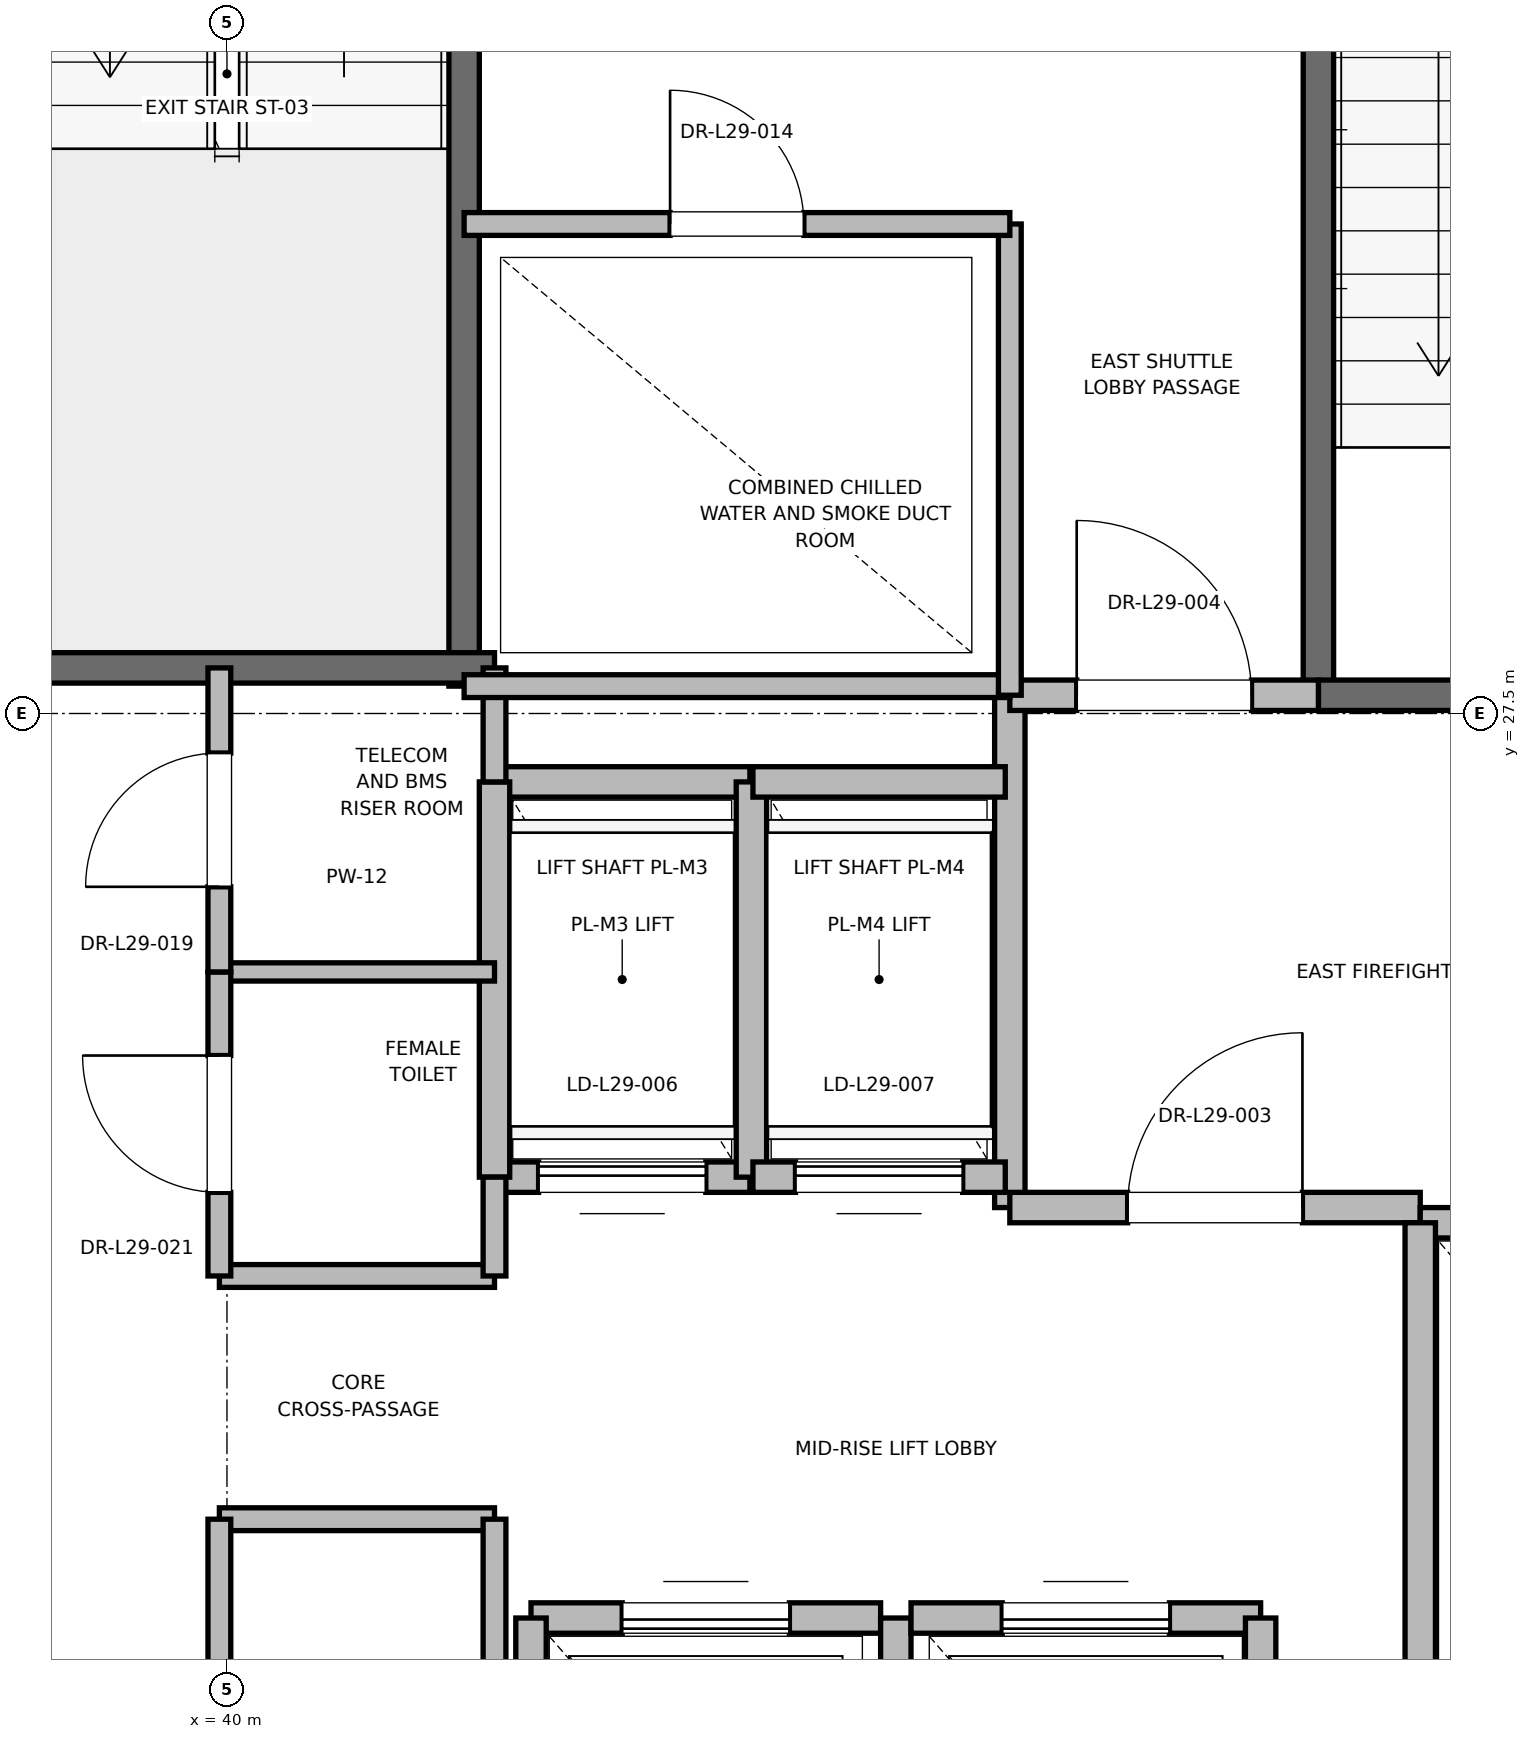
"""IFC4 building model, lengths in metres.
Left out: names, types, materials, properties, quantities, classifications, styles, units other than length and angle.
Written with IfcOpenShell. Run it as: python <this file> out.ifc"""

import sys

from ifc_helpers import new_model, si_unit, direction, frame, frame_2d, origin, place, context, subcontext, project, spatial, rectangle, extrude, element, fill, save


model = new_model("IFC4")
c1 = context("Model", 3, precision=1e-05, world=origin(), true_north=direction((0.0, 1.0)))
c2 = subcontext(c1, "Body", "Model", "MODEL_VIEW")
j1 = project(units=[si_unit("LENGTHUNIT", "METRE"), si_unit("PLANEANGLEUNIT", "RADIAN")], contexts=[c1])
p1 = place(None, origin())
s1 = spatial("IfcSite", under=j1, at=p1, CompositionType="ELEMENT")
p2 = place(p1, origin())
s2 = spatial("IfcBuilding", under=s1, at=p2, CompositionType="ELEMENT")
p3 = place(p2, frame((0.0, 0.0, 128.4)))
s3 = spatial("IfcBuildingStorey", under=s2, at=p3, CompositionType="ELEMENT", Elevation=128.4)
p4 = place(p3, frame((47.18, 27.62, 0.0), z_axis=(0.0, 0.0, 1.0), x_axis=(0.0, 1.0, 0.0)))
e1 = element("IfcWall", 1, at=p4, inside=s3, PredefinedType="SOLIDWALL", context=c2, shape_type="SweptSolid", body=[
    extrude(rectangle(XDim=8.18, YDim=0.2, at=frame_2d((4.09, 0.0))), origin(), (0.0, 0.0, 1.0), 3.775),
])
p5 = place(p3, frame((47.18, 27.62, 0.0), z_axis=(0.0, 0.0, 1.0), x_axis=(1.0, 0.0, 0.0)))
e2 = element("IfcWall", 2, at=p5, inside=s3, PredefinedType="SOLIDWALL", context=c2, shape_type="SweptSolid", body=[
    extrude(rectangle(XDim=3.12, YDim=0.2, at=frame_2d((1.56, 0.0))), origin(), (0.0, 0.0, 1.0), 3.775),
])
p6 = place(p5, frame((1.01, 0.0, 0.0)))
e3 = element("IfcOpeningElement", 3, at=p6, cuts=e2, PredefinedType="OPENING", context=c2, shape_type="SweptSolid", body=[
    extrude(rectangle(XDim=1.1, YDim=2.15, at=frame_2d((0.55, 1.075))), frame((0.0, 0.1, 0.0), z_axis=(0.0, -1.0, 0.0), x_axis=(1.0, 0.0, 0.0)), (0.0, 0.0, 1.0), 0.2),
])
p7 = place(p3, frame((41.56, 27.68, 0.0), z_axis=(0.0, 0.0, 1.0), x_axis=(0.0, 1.0, 0.0)))
e4 = element("IfcWall", 4, at=p7, inside=s3, PredefinedType="SOLIDWALL", context=c2, shape_type="SweptSolid", body=[
    extrude(rectangle(XDim=8.57, YDim=0.2, at=frame_2d((4.285, 0.0))), origin(), (0.0, 0.0, 1.0), 3.775),
])
p8 = place(p3, frame((38.44, 27.8, 0.0), z_axis=(0.0, 0.0, 1.0), x_axis=(1.0, 0.0, 0.0)))
e5 = element("IfcWall", 5, at=p8, inside=s3, PredefinedType="SOLIDWALL", context=c2, shape_type="SweptSolid", body=[
    extrude(rectangle(XDim=3.32, YDim=0.2, at=frame_2d((1.66, 0.0))), origin(), (0.0, 0.0, 1.0), 3.775),
])
p9 = place(p3, frame((45.15, 24.25, 0.0), z_axis=(0.0, 0.0, 1.0), x_axis=(0.0, 1.0, 0.0)))
e6 = element("IfcWall", 6, at=p9, inside=s3, PredefinedType="PARTITIONING", context=c2, shape_type="SweptSolid", body=[
    extrude(rectangle(XDim=3.37, YDim=0.2, at=frame_2d((1.685, 0.0))), origin(), (0.0, 0.0, 1.0), 3.775),
])
p10 = place(p3, frame((45.15, 24.25, 0.0), z_axis=(0.0, 0.0, 1.0), x_axis=(1.0, 0.0, 0.0)))
e7 = element("IfcWall", 7, at=p10, inside=s3, PredefinedType="PARTITIONING", context=c2, shape_type="SweptSolid", body=[
    extrude(rectangle(XDim=2.7, YDim=0.2, at=frame_2d((1.35, 0.0))), origin(), (0.0, 0.0, 1.0), 3.775),
])
p11 = place(p10, frame((0.775, 0.0, 0.0)))
e8 = element("IfcOpeningElement", 8, at=p11, cuts=e7, PredefinedType="OPENING", context=c2, shape_type="SweptSolid", body=[
    extrude(rectangle(XDim=1.15, YDim=2.2, at=frame_2d((0.575, 1.1))), frame((0.0, 0.1, 0.0), z_axis=(0.0, -1.0, 0.0), x_axis=(1.0, 0.0, 0.0)), (0.0, 0.0, 1.0), 0.2),
])
p12 = place(p3, frame((45.15, 27.62, 0.0), z_axis=(0.0, 0.0, 1.0), x_axis=(1.0, 0.0, 0.0)))
e9 = element("IfcWall", 9, at=p12, inside=s3, PredefinedType="PARTITIONING", context=c2, shape_type="SweptSolid", body=[
    extrude(rectangle(XDim=2.03, YDim=0.2, at=frame_2d((1.015, 0.0))), origin(), (0.0, 0.0, 1.0), 3.775),
])
p13 = place(p12, frame((0.44, 0.0, 0.0)))
e10 = element("IfcOpeningElement", 10, at=p13, cuts=e9, PredefinedType="OPENING", context=c2, shape_type="SweptSolid", body=[
    extrude(rectangle(XDim=1.15, YDim=2.2, at=frame_2d((0.575, 1.1))), frame((0.0, 0.1, 0.0), z_axis=(0.0, -1.0, 0.0), x_axis=(1.0, 0.0, 0.0)), (0.0, 0.0, 1.0), 0.2),
])
p14 = place(p3, frame((50.45, 24.15, 0.0), z_axis=(0.0, 0.0, 1.0), x_axis=(-1.0, 0.0, 0.0)))
e11 = element("IfcWall", 11, at=p14, inside=s3, PredefinedType="SOLIDWALL", context=c2, shape_type="SweptSolid", body=[
    extrude(rectangle(XDim=2.6, YDim=0.2, at=frame_2d((1.3, 0.0))), origin(), (0.0, 0.0, 1.0), 2.755),
])
p15 = place(p14, frame((0.75, 0.0, 0.0)))
e12 = element("IfcOpeningElement", 12, at=p15, cuts=e11, PredefinedType="OPENING", context=c2, shape_type="SweptSolid", body=[
    extrude(rectangle(XDim=1.1, YDim=2.2, at=frame_2d((0.55, 1.1))), frame((0.0, 0.1, 0.0), z_axis=(0.0, -1.0, 0.0), x_axis=(1.0, 0.0, 0.0)), (0.0, 0.0, 1.0), 0.2),
])
p16 = place(p3, frame((47.85, 24.15, 0.0), z_axis=(0.0, 0.0, 1.0), x_axis=(0.0, -1.0, 0.0)))
e13 = element("IfcWall", 13, at=p16, inside=s3, PredefinedType="SOLIDWALL", context=c2, shape_type="SweptSolid", body=[
    extrude(rectangle(XDim=3.0, YDim=0.2, at=frame_2d((1.5, 0.0))), origin(), (0.0, 0.0, 1.0), 3.775),
])
p17 = place(p3, frame((44.3, 21.55, 0.0), z_axis=(0.0, 0.0, 1.0), x_axis=(-1.0, 0.0, 0.0)))
e14 = element("IfcWall", 14, at=p17, inside=s3, PredefinedType="SOLIDWALL", context=c2, shape_type="SweptSolid", body=[
    extrude(rectangle(XDim=2.3, YDim=0.2, at=frame_2d((1.15, 0.0))), origin(), (0.0, 0.0, 1.0), 3.775),
])
p18 = place(p17, frame((0.6, 0.0, 0.0)))
e15 = element("IfcOpeningElement", 15, at=p18, cuts=e14, PredefinedType="OPENING", context=c2, shape_type="SweptSolid", body=[
    extrude(rectangle(XDim=1.1, YDim=2.2, at=frame_2d((0.55, 1.1))), frame((0.0, 0.1, 0.0), z_axis=(0.0, -1.0, 0.0), x_axis=(1.0, 0.0, 0.0)), (0.0, 0.0, 1.0), 0.2),
])
p19 = place(p3, frame((42.0, 21.55, 0.0), z_axis=(0.0, 0.0, 1.0), x_axis=(0.0, -1.0, 0.0)))
e16 = element("IfcWall", 16, at=p19, inside=s3, PredefinedType="SOLIDWALL", context=c2, shape_type="SweptSolid", body=[
    extrude(rectangle(XDim=2.6, YDim=0.2, at=frame_2d((1.3, 0.0))), origin(), (0.0, 0.0, 1.0), 2.755),
])
p20 = place(p3, frame((44.4, 18.95, 0.0), z_axis=(0.0, 0.0, 1.0), x_axis=(0.0, 1.0, 0.0)))
e17 = element("IfcWall", 17, at=p20, inside=s3, PredefinedType="SOLIDWALL", context=c2, shape_type="SweptSolid", body=[
    extrude(rectangle(XDim=2.6, YDim=0.2, at=frame_2d((1.3, 0.0))), origin(), (0.0, 0.0, 1.0), 3.775),
])
p21 = place(p3, frame((46.8, 21.55, 0.0), z_axis=(0.0, 0.0, 1.0), x_axis=(-1.0, 0.0, 0.0)))
e18 = element("IfcWall", 18, at=p21, inside=s3, PredefinedType="SOLIDWALL", context=c2, shape_type="SweptSolid", body=[
    extrude(rectangle(XDim=2.3, YDim=0.2, at=frame_2d((1.15, 0.0))), origin(), (0.0, 0.0, 1.0), 3.775),
])
p22 = place(p21, frame((0.6, 0.0, 0.0)))
e19 = element("IfcOpeningElement", 19, at=p22, cuts=e18, PredefinedType="OPENING", context=c2, shape_type="SweptSolid", body=[
    extrude(rectangle(XDim=1.1, YDim=2.2, at=frame_2d((0.55, 1.1))), frame((0.0, 0.1, 0.0), z_axis=(0.0, -1.0, 0.0), x_axis=(1.0, 0.0, 0.0)), (0.0, 0.0, 1.0), 0.2),
])
p23 = place(p3, frame((46.8, 18.95, 0.0), z_axis=(0.0, 0.0, 1.0), x_axis=(0.0, 1.0, 0.0)))
e20 = element("IfcWall", 20, at=p23, inside=s3, PredefinedType="SOLIDWALL", context=c2, shape_type="SweptSolid", body=[
    extrude(rectangle(XDim=2.6, YDim=0.2, at=frame_2d((1.3, 0.0))), origin(), (0.0, 0.0, 1.0), 3.775),
])
p24 = place(p3, frame((41.76, 24.45, 0.0), z_axis=(0.0, 0.0, 1.0), x_axis=(1.0, 0.0, 0.0)))
e21 = element("IfcWall", 21, at=p24, inside=s3, PredefinedType="SOLIDWALL", context=c2, shape_type="SweptSolid", body=[
    extrude(rectangle(XDim=1.68, YDim=0.2, at=frame_2d((0.84, 0.0))), origin(), (0.0, 0.0, 1.0), 3.775),
])
p25 = place(p24, frame((0.29, 0.0, 0.0)))
e22 = element("IfcOpeningElement", 22, at=p25, cuts=e21, PredefinedType="OPENING", context=c2, shape_type="SweptSolid", body=[
    extrude(rectangle(XDim=1.1, YDim=2.2, at=frame_2d((0.55, 1.1))), frame((0.0, 0.1, 0.0), z_axis=(0.0, -1.0, 0.0), x_axis=(1.0, 0.0, 0.0)), (0.0, 0.0, 1.0), 0.2),
])
p26 = place(p3, frame((43.44, 27.05, 0.0), z_axis=(0.0, 0.0, 1.0), x_axis=(-1.0, 0.0, 0.0)))
e23 = element("IfcWall", 23, at=p26, inside=s3, PredefinedType="SOLIDWALL", context=c2, shape_type="SweptSolid", body=[
    extrude(rectangle(XDim=1.68, YDim=0.2, at=frame_2d((0.84, 0.0))), origin(), (0.0, 0.0, 1.0), 3.775),
])
for number, where, z_axis, x_axis in (
    (24, (41.76, 27.05, 0.0), (0.0, 0.0, 1.0), (0.0, -1.0, 0.0)),
    (25, (43.45, 24.45, 0.0), (0.0, 0.0, 1.0), (0.0, 1.0, 0.0)),
):
    element("IfcWall", number, at=place(p3, frame(where, z_axis=z_axis, x_axis=x_axis)), inside=s3, PredefinedType="SOLIDWALL", context=c2, shape_type="SweptSolid", body=[
        extrude(rectangle(XDim=2.6, YDim=0.2, at=frame_2d((1.3, 0.0))), origin(), (0.0, 0.0, 1.0), 3.775),
    ])
p27 = place(p3, frame((43.46, 24.45, 0.0), z_axis=(0.0, 0.0, 1.0), x_axis=(1.0, 0.0, 0.0)))
e26 = element("IfcWall", 26, at=p27, inside=s3, PredefinedType="SOLIDWALL", context=c2, shape_type="SweptSolid", body=[
    extrude(rectangle(XDim=1.66, YDim=0.2, at=frame_2d((0.83, 0.0))), origin(), (0.0, 0.0, 1.0), 3.775),
])
p28 = place(p27, frame((0.28, 0.0, 0.0)))
e27 = element("IfcOpeningElement", 27, at=p28, cuts=e26, PredefinedType="OPENING", context=c2, shape_type="SweptSolid", body=[
    extrude(rectangle(XDim=1.1, YDim=2.2, at=frame_2d((0.55, 1.1))), frame((0.0, 0.1, 0.0), z_axis=(0.0, -1.0, 0.0), x_axis=(1.0, 0.0, 0.0)), (0.0, 0.0, 1.0), 0.2),
])
p29 = place(p3, frame((45.12, 27.05, 0.0), z_axis=(0.0, 0.0, 1.0), x_axis=(-1.0, 0.0, 0.0)))
e28 = element("IfcWall", 28, at=p29, inside=s3, PredefinedType="SOLIDWALL", context=c2, shape_type="SweptSolid", body=[
    extrude(rectangle(XDim=1.66, YDim=0.2, at=frame_2d((0.83, 0.0))), origin(), (0.0, 0.0, 1.0), 3.775),
])
for number, where, z_axis, x_axis in (
    (29, (39.95, 22.2, 0.0), (0.0, 0.0, 1.0), (1.0, 0.0, 0.0)),
    (30, (39.95, 23.8, 0.0), (0.0, 0.0, 1.0), (1.0, 0.0, 0.0)),
):
    element("IfcWall", number, at=place(p3, frame(where, z_axis=z_axis, x_axis=x_axis)), inside=s3, PredefinedType="PARTITIONING", context=c2, shape_type="SweptSolid", body=[
        extrude(rectangle(XDim=1.81, YDim=0.15, at=frame_2d((0.905, 0.0))), origin(), (0.0, 0.0, 1.0), 2.85),
    ])
p30 = place(p3, frame((39.95, 25.8, 0.0), z_axis=(0.0, 0.0, 1.0), x_axis=(1.0, 0.0, 0.0)))
e31 = element("IfcWall", 31, at=p30, inside=s3, PredefinedType="PARTITIONING", context=c2, shape_type="SweptSolid", body=[
    extrude(rectangle(XDim=1.81, YDim=0.12, at=frame_2d((0.905, 0.0))), origin(), (0.0, 0.0, 1.0), 2.85),
])
p31 = place(p3, frame((41.76, 18.6, 0.0), z_axis=(0.0, 0.0, 1.0), x_axis=(0.0, 1.0, 0.0)))
e32 = element("IfcWall", 32, at=p31, inside=s3, PredefinedType="PARTITIONING", context=c2, shape_type="SweptSolid", body=[
    extrude(rectangle(XDim=3.6, YDim=0.15, at=frame_2d((1.8, 0.0))), origin(), (0.0, 0.0, 1.0), 2.755),
])
p32 = place(p3, frame((41.76, 23.8, 0.0), z_axis=(0.0, 0.0, 1.0), x_axis=(0.0, 1.0, 0.0)))
e33 = element("IfcWall", 33, at=p32, inside=s3, PredefinedType="PARTITIONING", context=c2, shape_type="SweptSolid", body=[
    extrude(rectangle(XDim=0.65, YDim=0.15, at=frame_2d((0.325, 0.0))), origin(), (0.0, 0.0, 1.0), 2.85),
])
p33 = place(p3, frame((41.76, 27.05, 0.0), z_axis=(0.0, 0.0, 1.0), x_axis=(0.0, 1.0, 0.0)))
e34 = element("IfcWall", 34, at=p33, inside=s3, PredefinedType="PARTITIONING", context=c2, shape_type="SweptSolid", body=[
    extrude(rectangle(XDim=0.75, YDim=0.15, at=frame_2d((0.375, 0.0))), origin(), (0.0, 0.0, 1.0), 2.85),
])
p34 = place(p3, frame((39.95, 19.2, 0.0), z_axis=(0.0, 0.0, 1.0), x_axis=(0.0, 1.0, 0.0)))
e35 = element("IfcWall", 35, at=p34, inside=s3, PredefinedType="PARTITIONING", context=c2, shape_type="SweptSolid", body=[
    extrude(rectangle(XDim=3.0, YDim=0.15, at=frame_2d((1.5, 0.0))), origin(), (0.0, 0.0, 1.0), 2.85),
])
p35 = place(p34, frame((1.05, 0.0, 0.0)))
e36 = element("IfcOpeningElement", 36, at=p35, cuts=e35, PredefinedType="OPENING", context=c2, shape_type="SweptSolid", body=[
    extrude(rectangle(XDim=0.9, YDim=2.1, at=frame_2d((0.45, 1.05))), frame((0.0, 0.075, 0.0), z_axis=(0.0, -1.0, 0.0), x_axis=(1.0, 0.0, 0.0)), (0.0, 0.0, 1.0), 0.15),
])
p36 = place(p3, frame((39.95, 23.8, 0.0), z_axis=(0.0, 0.0, 1.0), x_axis=(0.0, 1.0, 0.0)))
e37 = element("IfcWall", 37, at=p36, inside=s3, PredefinedType="PARTITIONING", context=c2, shape_type="SweptSolid", body=[
    extrude(rectangle(XDim=2.0, YDim=0.15, at=frame_2d((1.0, 0.0))), origin(), (0.0, 0.0, 1.0), 2.85),
])
p37 = place(p36, frame((0.55, 0.0, 0.0)))
e38 = element("IfcOpeningElement", 38, at=p37, cuts=e37, PredefinedType="OPENING", context=c2, shape_type="SweptSolid", body=[
    extrude(rectangle(XDim=0.9, YDim=2.1, at=frame_2d((0.45, 1.05))), frame((0.0, 0.075, 0.0), z_axis=(0.0, -1.0, 0.0), x_axis=(1.0, 0.0, 0.0)), (0.0, 0.0, 1.0), 0.15),
])
p38 = place(p3, frame((39.95, 25.8, 0.0), z_axis=(0.0, 0.0, 1.0), x_axis=(0.0, 1.0, 0.0)))
e39 = element("IfcWall", 39, at=p38, inside=s3, PredefinedType="PARTITIONING", context=c2, shape_type="SweptSolid", body=[
    extrude(rectangle(XDim=2.0, YDim=0.15, at=frame_2d((1.0, 0.0))), origin(), (0.0, 0.0, 1.0), 2.85),
])
p39 = place(p38, frame((0.56, 0.0, 0.0)))
e40 = element("IfcOpeningElement", 40, at=p39, cuts=e39, PredefinedType="OPENING", context=c2, shape_type="SweptSolid", body=[
    extrude(rectangle(XDim=0.88, YDim=2.1, at=frame_2d((0.44, 1.05))), frame((0.0, 0.075, 0.0), z_axis=(0.0, -1.0, 0.0), x_axis=(1.0, 0.0, 0.0)), (0.0, 0.0, 1.0), 0.15),
])
p40 = place(p3, frame((41.56, 27.68, 0.0), z_axis=(0.0, 0.0, 1.0), x_axis=(1.0, 0.0, 0.0)))
e41 = element("IfcWall", 41, at=p40, inside=s3, PredefinedType="PARTITIONING", context=c2, shape_type="SweptSolid", body=[
    extrude(rectangle(XDim=3.59, YDim=0.15, at=frame_2d((1.795, 0.0))), origin(), (0.0, 0.0, 1.0), 2.85),
])
p41 = place(p3, frame((45.15, 27.62, 0.0), z_axis=(0.0, 0.0, 1.0), x_axis=(0.0, 1.0, 0.0)))
e42 = element("IfcWall", 42, at=p41, inside=s3, PredefinedType="PARTITIONING", context=c2, shape_type="SweptSolid", body=[
    extrude(rectangle(XDim=3.1, YDim=0.15, at=frame_2d((1.55, 0.0))), origin(), (0.0, 0.0, 1.0), 2.85),
])
p42 = place(p3, frame((41.56, 30.72, 0.0), z_axis=(0.0, 0.0, 1.0), x_axis=(1.0, 0.0, 0.0)))
e43 = element("IfcWall", 43, at=p42, inside=s3, PredefinedType="PARTITIONING", context=c2, shape_type="SweptSolid", body=[
    extrude(rectangle(XDim=3.59, YDim=0.15, at=frame_2d((1.795, 0.0))), origin(), (0.0, 0.0, 1.0), 2.85),
])
p43 = place(p42, frame((1.355, 0.0, 0.0)))
e44 = element("IfcOpeningElement", 44, at=p43, cuts=e43, PredefinedType="OPENING", context=c2, shape_type="SweptSolid", body=[
    extrude(rectangle(XDim=0.88, YDim=2.1, at=frame_2d((0.44, 1.05))), frame((0.0, 0.075, 0.0), z_axis=(0.0, -1.0, 0.0), x_axis=(1.0, 0.0, 0.0)), (0.0, 0.0, 1.0), 0.15),
])
p44 = place(p11, origin())
e45 = element("IfcDoor", 45, at=p44, inside=s3, OperationType="SINGLE_SWING_RIGHT", PredefinedType="DOOR", context=c2, shape_type="SweptSolid", body=[
    extrude(rectangle(XDim=1.15, YDim=2.2, at=frame_2d((0.575, 1.1))), frame((0.0, 0.025, 0.0), z_axis=(0.0, -1.0, 0.0), x_axis=(1.0, 0.0, 0.0)), (0.0, 0.0, 1.0), 0.05),
])
fill(e8, e45)
p45 = place(p13, origin())
e46 = element("IfcDoor", 46, at=p45, inside=s3, OperationType="SINGLE_SWING_LEFT", PredefinedType="DOOR", context=c2, shape_type="SweptSolid", body=[
    extrude(rectangle(XDim=1.15, YDim=2.2, at=frame_2d((0.575, 1.1))), frame((0.0, 0.025, 0.0), z_axis=(0.0, -1.0, 0.0), x_axis=(1.0, 0.0, 0.0)), (0.0, 0.0, 1.0), 0.05),
])
fill(e10, e46)
p46 = place(p18, origin())
e47 = element("IfcDoor", 47, at=p46, inside=s3, OperationType="SLIDING_TO_RIGHT", PredefinedType="DOOR", context=c2, shape_type="SweptSolid", body=[
    extrude(rectangle(XDim=1.1, YDim=2.2, at=frame_2d((0.55, 1.1))), frame((0.0, 0.025, 0.0), z_axis=(0.0, -1.0, 0.0), x_axis=(1.0, 0.0, 0.0)), (0.0, 0.0, 1.0), 0.05),
])
fill(e15, e47)
p47 = place(p22, origin())
e48 = element("IfcDoor", 48, at=p47, inside=s3, OperationType="SLIDING_TO_RIGHT", PredefinedType="DOOR", context=c2, shape_type="SweptSolid", body=[
    extrude(rectangle(XDim=1.1, YDim=2.2, at=frame_2d((0.55, 1.1))), frame((0.0, 0.025, 0.0), z_axis=(0.0, -1.0, 0.0), x_axis=(1.0, 0.0, 0.0)), (0.0, 0.0, 1.0), 0.05),
])
fill(e19, e48)
p48 = place(p25, origin())
e49 = element("IfcDoor", 49, at=p48, inside=s3, OperationType="SLIDING_TO_RIGHT", PredefinedType="DOOR", context=c2, shape_type="SweptSolid", body=[
    extrude(rectangle(XDim=1.1, YDim=2.2, at=frame_2d((0.55, 1.1))), frame((0.0, 0.025, 0.0), z_axis=(0.0, -1.0, 0.0), x_axis=(1.0, 0.0, 0.0)), (0.0, 0.0, 1.0), 0.05),
])
fill(e22, e49)
p49 = place(p28, origin())
e50 = element("IfcDoor", 50, at=p49, inside=s3, OperationType="SLIDING_TO_RIGHT", PredefinedType="DOOR", context=c2, shape_type="SweptSolid", body=[
    extrude(rectangle(XDim=1.1, YDim=2.2, at=frame_2d((0.55, 1.1))), frame((0.0, 0.025, 0.0), z_axis=(0.0, -1.0, 0.0), x_axis=(1.0, 0.0, 0.0)), (0.0, 0.0, 1.0), 0.05),
])
fill(e27, e50)
p50 = place(p37, origin())
e51 = element("IfcDoor", 51, at=p50, inside=s3, OperationType="SINGLE_SWING_RIGHT", PredefinedType="DOOR", context=c2, shape_type="SweptSolid", body=[
    extrude(rectangle(XDim=0.9, YDim=2.1, at=frame_2d((0.45, 1.05))), frame((0.0, 0.025, 0.0), z_axis=(0.0, -1.0, 0.0), x_axis=(1.0, 0.0, 0.0)), (0.0, 0.0, 1.0), 0.05),
])
fill(e38, e51)
p51 = place(p39, origin())
e52 = element("IfcDoor", 52, at=p51, inside=s3, OperationType="SINGLE_SWING_LEFT", PredefinedType="DOOR", context=c2, shape_type="SweptSolid", body=[
    extrude(rectangle(XDim=0.88, YDim=2.1, at=frame_2d((0.44, 1.05))), frame((0.0, 0.025, 0.0), z_axis=(0.0, -1.0, 0.0), x_axis=(1.0, 0.0, 0.0)), (0.0, 0.0, 1.0), 0.05),
])
fill(e40, e52)
p52 = place(p43, origin())
e53 = element("IfcDoor", 53, at=p52, inside=s3, OperationType="SINGLE_SWING_LEFT", PredefinedType="DOOR", context=c2, shape_type="SweptSolid", body=[
    extrude(rectangle(XDim=0.88, YDim=2.1, at=frame_2d((0.44, 1.05))), frame((0.0, 0.025, 0.0), z_axis=(0.0, -1.0, 0.0), x_axis=(1.0, 0.0, 0.0)), (0.0, 0.0, 1.0), 0.05),
])
fill(e44, e53)
save(model, sys.argv[1])
